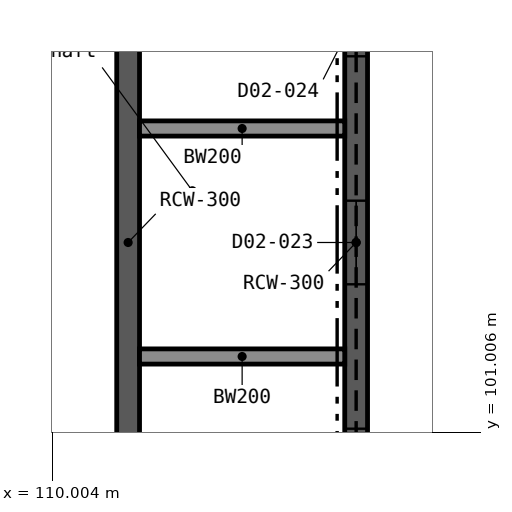
"""IFC4 building model, lengths in metres.
Left out: names, types, materials, properties, quantities, classifications, styles, units other than length and angle.
Written with IfcOpenShell. Run it as: python <this file> out.ifc"""

import sys

from ifc_helpers import new_model, si_unit, direction, frame, frame_2d, origin, place, context, subcontext, project, spatial, rectangle, extrude, element, fill, save


model = new_model("IFC4")
c1 = context("Model", 3, precision=1e-05, world=origin(), true_north=direction((0.0, 1.0)))
c2 = subcontext(c1, "Body", "Model", "MODEL_VIEW")
j1 = project(units=[si_unit("LENGTHUNIT", "METRE"), si_unit("PLANEANGLEUNIT", "RADIAN")], contexts=[c1])
p1 = place(None, origin())
s1 = spatial("IfcSite", under=j1, at=p1, CompositionType="ELEMENT")
p2 = place(p1, origin())
s2 = spatial("IfcBuilding", under=s1, at=p2, CompositionType="ELEMENT")
p3 = place(p2, frame((0.0, 0.0, 10.8)))
s3 = spatial("IfcBuildingStorey", under=s2, at=p3, CompositionType="ELEMENT", Elevation=10.8)
p4 = place(p3, frame((111.0, 99.15, 0.0), z_axis=(0.0, 0.0, 1.0), x_axis=(0.0, 1.0, 0.0)))
e1 = element("IfcWall", 1, at=p4, inside=s3, PredefinedType="SHEAR", context=c2, shape_type="SweptSolid", body=[
    extrude(rectangle(XDim=8.7, YDim=0.3, at=frame_2d((4.35, 0.0))), origin(), (0.0, 0.0, 1.0), 5.4),
])
p5 = place(p3, frame((114.0, 99.15, 0.0), z_axis=(0.0, 0.0, 1.0), x_axis=(0.0, 1.0, 0.0)))
e2 = element("IfcWall", 2, at=p5, inside=s3, PredefinedType="SHEAR", context=c2, shape_type="SweptSolid", body=[
    extrude(rectangle(XDim=8.7, YDim=0.3, at=frame_2d((4.35, 0.0))), origin(), (0.0, 0.0, 1.0), 5.4),
])
p6 = place(p5, frame((0.8, 0.0, 0.0)))
e3 = element("IfcOpeningElement", 3, at=p6, cuts=e2, PredefinedType="OPENING", context=c2, shape_type="SweptSolid", body=[
    extrude(rectangle(XDim=1.1, YDim=2.1, at=frame_2d((0.55, 1.05))), frame((0.0, 0.161, 0.0), z_axis=(0.0, -1.0, 0.0), x_axis=(1.0, 0.0, 0.0)), (0.0, 0.0, 1.0), 0.322),
])
p7 = place(p5, frame((3.8, 0.0, 0.0)))
e4 = element("IfcOpeningElement", 4, at=p7, cuts=e2, PredefinedType="OPENING", context=c2, shape_type="SweptSolid", body=[
    extrude(rectangle(XDim=1.1, YDim=2.1, at=frame_2d((0.55, 1.05))), frame((0.0, 0.161, 0.0), z_axis=(0.0, -1.0, 0.0), x_axis=(1.0, 0.0, 0.0)), (0.0, 0.0, 1.0), 0.322),
])
p8 = place(p5, frame((6.8, 0.0, 0.0)))
e5 = element("IfcOpeningElement", 5, at=p8, cuts=e2, PredefinedType="OPENING", context=c2, shape_type="SweptSolid", body=[
    extrude(rectangle(XDim=1.1, YDim=2.1, at=frame_2d((0.55, 1.05))), frame((0.0, 0.161, 0.0), z_axis=(0.0, -1.0, 0.0), x_axis=(1.0, 0.0, 0.0)), (0.0, 0.0, 1.0), 0.322),
])
for number, where, z_axis, x_axis in (
    (6, (111.15, 102.0, 0.0), (0.0, 0.0, 1.0), (1.0, 0.0, 0.0)),
    (7, (111.15, 105.0, 0.0), (0.0, 0.0, 1.0), (1.0, 0.0, 0.0)),
):
    element("IfcWall", number, at=place(p3, frame(where, z_axis=z_axis, x_axis=x_axis)), inside=s3, PredefinedType="SOLIDWALL", context=c2, shape_type="SweptSolid", body=[
        extrude(rectangle(XDim=2.7, YDim=0.2, at=frame_2d((1.35, 0.0))), origin(), (0.0, 0.0, 1.0), 5.4),
    ])
p9 = place(p6, origin())
e8 = element("IfcDoor", 8, at=p9, inside=s3, OperationType="DOUBLE_DOOR_SLIDING", PredefinedType="DOOR", context=c2, shape_type="SweptSolid", body=[
    extrude(rectangle(XDim=1.1, YDim=2.1, at=frame_2d((0.55, 1.05))), frame((0.0, 0.025, 0.0), z_axis=(0.0, -1.0, 0.0), x_axis=(1.0, 0.0, 0.0)), (0.0, 0.0, 1.0), 0.05),
])
fill(e3, e8)
p10 = place(p7, origin())
e9 = element("IfcDoor", 9, at=p10, inside=s3, OperationType="DOUBLE_DOOR_SLIDING", PredefinedType="DOOR", context=c2, shape_type="SweptSolid", body=[
    extrude(rectangle(XDim=1.1, YDim=2.1, at=frame_2d((0.55, 1.05))), frame((0.0, 0.025, 0.0), z_axis=(0.0, -1.0, 0.0), x_axis=(1.0, 0.0, 0.0)), (0.0, 0.0, 1.0), 0.05),
])
fill(e4, e9)
p11 = place(p8, origin())
e10 = element("IfcDoor", 10, at=p11, inside=s3, OperationType="DOUBLE_DOOR_SLIDING", PredefinedType="DOOR", context=c2, shape_type="SweptSolid", body=[
    extrude(rectangle(XDim=1.1, YDim=2.1, at=frame_2d((0.55, 1.05))), frame((0.0, 0.025, 0.0), z_axis=(0.0, -1.0, 0.0), x_axis=(1.0, 0.0, 0.0)), (0.0, 0.0, 1.0), 0.05),
])
fill(e5, e10)
save(model, sys.argv[1])
